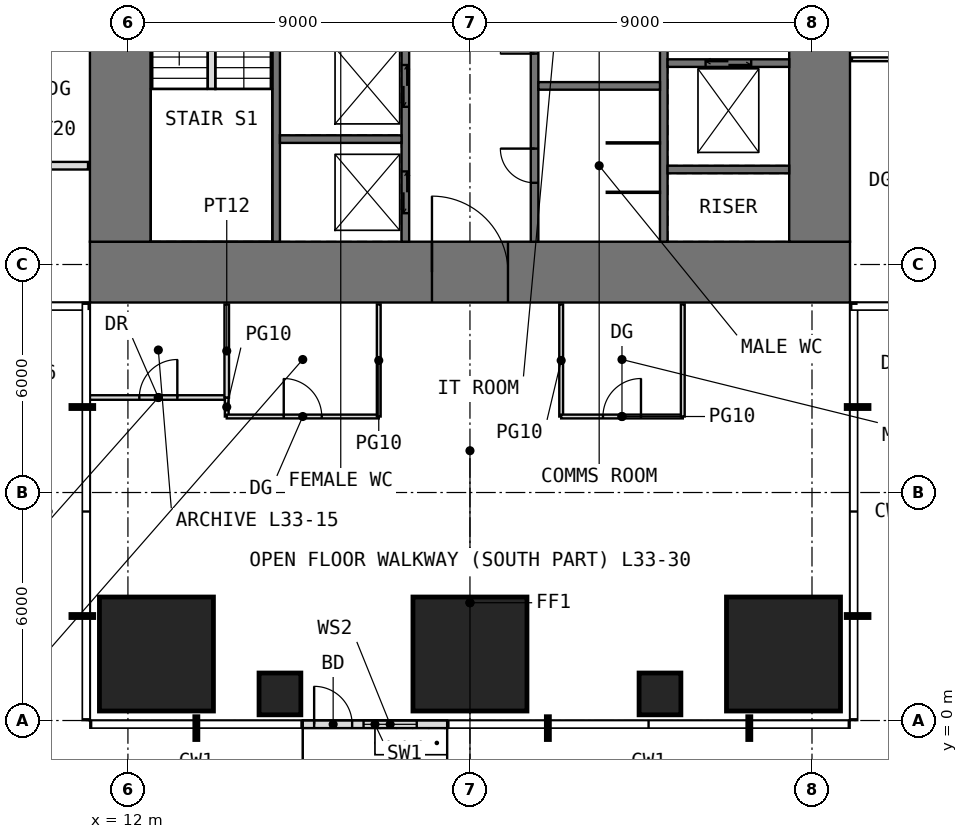
"""IFC4 building model, lengths in metres.
Left out: names, types, materials, properties, quantities, classifications, styles, units other than length and angle.
Written with IfcOpenShell. Run it as: python <this file> out.ifc"""

import sys

from ifc_helpers import new_model, si_unit, direction, frame, frame_2d, origin, origin_2d, place, context, subcontext, project, spatial, rectangle, extrude, element, fill, save


model = new_model("IFC4")
c1 = context("Model", 3, precision=1e-05, world=origin(), true_north=direction((0.0, 1.0)))
c2 = subcontext(c1, "Body", "Model", "MODEL_VIEW")
j1 = project(units=[si_unit("LENGTHUNIT", "METRE"), si_unit("PLANEANGLEUNIT", "RADIAN")], contexts=[c1])
p1 = place(None, origin())
s1 = spatial("IfcSite", under=j1, at=p1, CompositionType="ELEMENT")
p2 = place(p1, origin())
s2 = spatial("IfcBuilding", under=s1, at=p2, CompositionType="ELEMENT")
p3 = place(p2, frame((0.0, 0.0, 140.5)))
s3 = spatial("IfcBuildingStorey", under=s2, at=p3, CompositionType="ELEMENT", Elevation=140.5)
p4 = place(p3, frame((12.75, 1.75, 0.0), z_axis=(0.0, 0.0, 1.0), x_axis=(1.0, 0.0, 0.0)))
e1 = element("IfcColumn", 1, at=p4, inside=s3, PredefinedType="COLUMN", context=c2, shape_type="SweptSolid", body=[
    extrude(rectangle(XDim=3.0, YDim=3.0, at=origin_2d()), origin(), (0.0, 0.0, 1.0), 4.0),
])
p5 = place(p3, frame((16.0, 0.7, 0.0), z_axis=(0.0, 0.0, 1.0), x_axis=(1.0, 0.0, 0.0)))
e2 = element("IfcColumn", 2, at=p5, inside=s3, PredefinedType="COLUMN", context=c2, shape_type="SweptSolid", body=[
    extrude(rectangle(XDim=1.1, YDim=1.1, at=origin_2d()), origin(), (0.0, 0.0, 1.0), 4.0),
])
p6 = place(p3, frame((21.0, 1.75, 0.0), z_axis=(0.0, 0.0, 1.0), x_axis=(1.0, 0.0, 0.0)))
e3 = element("IfcColumn", 3, at=p6, inside=s3, PredefinedType="COLUMN", context=c2, shape_type="SweptSolid", body=[
    extrude(rectangle(XDim=3.0, YDim=3.0, at=origin_2d()), origin(), (0.0, 0.0, 1.0), 4.0),
])
p7 = place(p3, frame((26.0, 0.7, 0.0), z_axis=(0.0, 0.0, 1.0), x_axis=(1.0, 0.0, 0.0)))
e4 = element("IfcColumn", 4, at=p7, inside=s3, PredefinedType="COLUMN", context=c2, shape_type="SweptSolid", body=[
    extrude(rectangle(XDim=1.1, YDim=1.1, at=origin_2d()), origin(), (0.0, 0.0, 1.0), 4.0),
])
p8 = place(p3, frame((29.25, 1.75, 0.0), z_axis=(0.0, 0.0, 1.0), x_axis=(1.0, 0.0, 0.0)))
e5 = element("IfcColumn", 5, at=p8, inside=s3, PredefinedType="COLUMN", context=c2, shape_type="SweptSolid", body=[
    extrude(rectangle(XDim=3.0, YDim=3.0, at=origin_2d()), origin(), (0.0, 0.0, 1.0), 4.0),
])
p9 = place(p3, frame((16.6, -0.1, 0.0), z_axis=(0.0, 0.0, 1.0), x_axis=(1.0, 0.0, 0.0)))
e6 = element("IfcWall", 6, at=p9, inside=s3, PredefinedType="USERDEFINED", context=c2, shape_type="SweptSolid", body=[
    extrude(rectangle(XDim=3.8, YDim=0.2, at=frame_2d((1.9, 0.0))), origin(), (0.0, 0.0, 1.0), 3.75),
])
p10 = place(p9, frame((0.3, 0.0, 0.0)))
e7 = element("IfcOpeningElement", 7, at=p10, cuts=e6, PredefinedType="OPENING", context=c2, shape_type="SweptSolid", body=[
    extrude(rectangle(XDim=1.0, YDim=2.4, at=frame_2d((0.5, 1.2))), frame((0.0, 0.11, 0.0), z_axis=(0.0, -1.0, 0.0), x_axis=(1.0, 0.0, 0.0)), (0.0, 0.0, 1.0), 0.22),
])
p11 = place(p9, frame((1.6, 0.0, 0.3)))
e8 = element("IfcOpeningElement", 8, at=p11, cuts=e6, PredefinedType="OPENING", context=c2, shape_type="SweptSolid", body=[
    extrude(rectangle(XDim=1.4, YDim=2.7, at=frame_2d((0.7, 1.35))), frame((0.0, 0.11, 0.0), z_axis=(0.0, -1.0, 0.0), x_axis=(1.0, 0.0, 0.0)), (0.0, 0.0, 1.0), 0.22),
])
p12 = place(p3, frame((11.0, 11.8, -0.05), z_axis=(0.0, 0.0, 1.0), x_axis=(1.0, 0.0, 0.0)))
e9 = element("IfcWall", 9, at=p12, inside=s3, PredefinedType="SHEAR", context=c2, shape_type="SweptSolid", body=[
    extrude(rectangle(XDim=20.0, YDim=1.6, at=frame_2d((10.0, 0.0))), origin(), (0.0, 0.0, 1.0), 4.0),
])
p13 = place(p12, frame((9.0, 0.0, 0.05)))
e10 = element("IfcOpeningElement", 10, at=p13, cuts=e9, PredefinedType="OPENING", context=c2, shape_type="SweptSolid", body=[
    extrude(rectangle(XDim=2.0, YDim=2.2, at=frame_2d((1.0, 1.1))), frame((0.0, 0.81, 0.0), z_axis=(0.0, -1.0, 0.0), x_axis=(1.0, 0.0, 0.0)), (0.0, 0.0, 1.0), 1.62),
])
p14 = place(p3, frame((11.8, 12.6, -0.05), z_axis=(0.0, 0.0, 1.0), x_axis=(0.0, 1.0, 0.0)))
e11 = element("IfcWall", 11, at=p14, inside=s3, PredefinedType="SHEAR", context=c2, shape_type="SweptSolid", body=[
    extrude(rectangle(XDim=16.8, YDim=1.6, at=frame_2d((8.4, 0.0))), origin(), (0.0, 0.0, 1.0), 4.0),
])
p15 = place(p14, frame((9.9, 0.0, 0.05)))
e12 = element("IfcOpeningElement", 12, at=p15, cuts=e11, PredefinedType="OPENING", context=c2, shape_type="SweptSolid", body=[
    extrude(rectangle(XDim=1.0, YDim=2.2, at=frame_2d((0.5, 1.1))), frame((0.0, 0.81, 0.0), z_axis=(0.0, -1.0, 0.0), x_axis=(1.0, 0.0, 0.0)), (0.0, 0.0, 1.0), 1.62),
])
p16 = place(p3, frame((30.2, 12.6, -0.05), z_axis=(0.0, 0.0, 1.0), x_axis=(0.0, 1.0, 0.0)))
e13 = element("IfcWall", 13, at=p16, inside=s3, PredefinedType="SHEAR", context=c2, shape_type="SweptSolid", body=[
    extrude(rectangle(XDim=16.8, YDim=1.6, at=frame_2d((8.4, 0.0))), origin(), (0.0, 0.0, 1.0), 4.0),
])
p17 = place(p16, frame((5.9, 0.0, 0.05)))
e14 = element("IfcOpeningElement", 14, at=p17, cuts=e13, PredefinedType="OPENING", context=c2, shape_type="SweptSolid", body=[
    extrude(rectangle(XDim=1.0, YDim=2.2, at=frame_2d((0.5, 1.1))), frame((0.0, 0.81, 0.0), z_axis=(0.0, -1.0, 0.0), x_axis=(1.0, 0.0, 0.0)), (0.0, 0.0, 1.0), 1.62),
])
p18 = place(p3, frame((15.9, 12.6, -0.05), z_axis=(0.0, 0.0, 1.0), x_axis=(0.0, 1.0, 0.0)))
e15 = element("IfcWall", 15, at=p18, inside=s3, PredefinedType="SHEAR", context=c2, shape_type="SweptSolid", body=[
    extrude(rectangle(XDim=16.8, YDim=0.2, at=frame_2d((8.4, 0.0))), origin(), (0.0, 0.0, 1.0), 4.0),
])
p19 = place(p18, frame((8.9, 0.0, 0.05)))
e16 = element("IfcOpeningElement", 16, at=p19, cuts=e15, PredefinedType="OPENING", context=c2, shape_type="SweptSolid", body=[
    extrude(rectangle(XDim=1.0, YDim=2.2, at=frame_2d((0.5, 1.1))), frame((0.0, 0.11, 0.0), z_axis=(0.0, -1.0, 0.0), x_axis=(1.0, 0.0, 0.0)), (0.0, 0.0, 1.0), 0.22),
])
p20 = place(p3, frame((19.3, 12.6, -0.05), z_axis=(0.0, 0.0, 1.0), x_axis=(0.0, 1.0, 0.0)))
e17 = element("IfcWall", 17, at=p20, inside=s3, PredefinedType="SHEAR", context=c2, shape_type="SweptSolid", body=[
    extrude(rectangle(XDim=16.8, YDim=0.2, at=frame_2d((8.4, 0.0))), origin(), (0.0, 0.0, 1.0), 4.0),
])
p21 = place(p20, frame((8.7, 0.0, 0.05)))
e18 = element("IfcOpeningElement", 18, at=p21, cuts=e17, PredefinedType="OPENING", context=c2, shape_type="SweptSolid", body=[
    extrude(rectangle(XDim=1.0, YDim=2.2, at=frame_2d((0.5, 1.1))), frame((0.0, 0.11, 0.0), z_axis=(0.0, -1.0, 0.0), x_axis=(1.0, 0.0, 0.0)), (0.0, 0.0, 1.0), 0.22),
])
p22 = place(p20, frame((10.85, 0.0, 0.05)))
e19 = element("IfcOpeningElement", 19, at=p22, cuts=e17, PredefinedType="OPENING", context=c2, shape_type="SweptSolid", body=[
    extrude(rectangle(XDim=0.9, YDim=2.2, at=frame_2d((0.45, 1.1))), frame((0.0, 0.11, 0.0), z_axis=(0.0, -1.0, 0.0), x_axis=(1.0, 0.0, 0.0)), (0.0, 0.0, 1.0), 0.22),
])
p23 = place(p20, frame((13.3, 0.0, 0.05)))
e20 = element("IfcOpeningElement", 20, at=p23, cuts=e17, PredefinedType="OPENING", context=c2, shape_type="SweptSolid", body=[
    extrude(rectangle(XDim=1.0, YDim=2.2, at=frame_2d((0.5, 1.1))), frame((0.0, 0.11, 0.0), z_axis=(0.0, -1.0, 0.0), x_axis=(1.0, 0.0, 0.0)), (0.0, 0.0, 1.0), 0.22),
])
p24 = place(p20, frame((15.55, 0.0, 0.05)))
e21 = element("IfcOpeningElement", 21, at=p24, cuts=e17, PredefinedType="OPENING", context=c2, shape_type="SweptSolid", body=[
    extrude(rectangle(XDim=0.9, YDim=2.2, at=frame_2d((0.45, 1.1))), frame((0.0, 0.11, 0.0), z_axis=(0.0, -1.0, 0.0), x_axis=(1.0, 0.0, 0.0)), (0.0, 0.0, 1.0), 0.22),
])
p25 = place(p20, frame((0.75, 0.0, 0.05)))
e22 = element("IfcOpeningElement", 22, at=p25, cuts=e17, PredefinedType="OPENING", context=c2, shape_type="SweptSolid", body=[
    extrude(rectangle(XDim=1.1, YDim=2.2, at=frame_2d((0.55, 1.1))), frame((0.0, 0.11, 0.0), z_axis=(0.0, -1.0, 0.0), x_axis=(1.0, 0.0, 0.0)), (0.0, 0.0, 1.0), 0.22),
])
p26 = place(p20, frame((3.55, 0.0, 0.05)))
e23 = element("IfcOpeningElement", 23, at=p26, cuts=e17, PredefinedType="OPENING", context=c2, shape_type="SweptSolid", body=[
    extrude(rectangle(XDim=1.1, YDim=2.2, at=frame_2d((0.55, 1.1))), frame((0.0, 0.11, 0.0), z_axis=(0.0, -1.0, 0.0), x_axis=(1.0, 0.0, 0.0)), (0.0, 0.0, 1.0), 0.22),
])
p27 = place(p20, frame((6.35, 0.0, 0.05)))
e24 = element("IfcOpeningElement", 24, at=p27, cuts=e17, PredefinedType="OPENING", context=c2, shape_type="SweptSolid", body=[
    extrude(rectangle(XDim=1.1, YDim=2.2, at=frame_2d((0.55, 1.1))), frame((0.0, 0.11, 0.0), z_axis=(0.0, -1.0, 0.0), x_axis=(1.0, 0.0, 0.0)), (0.0, 0.0, 1.0), 0.22),
])
p28 = place(p3, frame((22.7, 12.6, -0.05), z_axis=(0.0, 0.0, 1.0), x_axis=(0.0, 1.0, 0.0)))
e25 = element("IfcWall", 25, at=p28, inside=s3, PredefinedType="SHEAR", context=c2, shape_type="SweptSolid", body=[
    extrude(rectangle(XDim=16.8, YDim=0.2, at=frame_2d((8.4, 0.0))), origin(), (0.0, 0.0, 1.0), 4.0),
])
p29 = place(p28, frame((7.1, 0.0, 0.05)))
e26 = element("IfcOpeningElement", 26, at=p29, cuts=e25, PredefinedType="OPENING", context=c2, shape_type="SweptSolid", body=[
    extrude(rectangle(XDim=1.0, YDim=2.2, at=frame_2d((0.5, 1.1))), frame((0.0, 0.11, 0.0), z_axis=(0.0, -1.0, 0.0), x_axis=(1.0, 0.0, 0.0)), (0.0, 0.0, 1.0), 0.22),
])
p30 = place(p28, frame((1.55, 0.0, 0.05)))
e27 = element("IfcOpeningElement", 27, at=p30, cuts=e25, PredefinedType="OPENING", context=c2, shape_type="SweptSolid", body=[
    extrude(rectangle(XDim=0.9, YDim=2.2, at=frame_2d((0.45, 1.1))), frame((0.0, 0.11, 0.0), z_axis=(0.0, -1.0, 0.0), x_axis=(1.0, 0.0, 0.0)), (0.0, 0.0, 1.0), 0.22),
])
p31 = place(p28, frame((4.95, 0.0, 0.05)))
e28 = element("IfcOpeningElement", 28, at=p31, cuts=e25, PredefinedType="OPENING", context=c2, shape_type="SweptSolid", body=[
    extrude(rectangle(XDim=0.9, YDim=2.2, at=frame_2d((0.45, 1.1))), frame((0.0, 0.11, 0.0), z_axis=(0.0, -1.0, 0.0), x_axis=(1.0, 0.0, 0.0)), (0.0, 0.0, 1.0), 0.22),
])
p32 = place(p28, frame((9.4, 0.0, 0.05)))
e29 = element("IfcOpeningElement", 29, at=p32, cuts=e25, PredefinedType="OPENING", context=c2, shape_type="SweptSolid", body=[
    extrude(rectangle(XDim=1.0, YDim=2.2, at=frame_2d((0.5, 1.1))), frame((0.0, 0.11, 0.0), z_axis=(0.0, -1.0, 0.0), x_axis=(1.0, 0.0, 0.0)), (0.0, 0.0, 1.0), 0.22),
])
p33 = place(p3, frame((26.1, 12.6, -0.05), z_axis=(0.0, 0.0, 1.0), x_axis=(0.0, 1.0, 0.0)))
e30 = element("IfcWall", 30, at=p33, inside=s3, PredefinedType="SHEAR", context=c2, shape_type="SweptSolid", body=[
    extrude(rectangle(XDim=16.8, YDim=0.2, at=frame_2d((8.4, 0.0))), origin(), (0.0, 0.0, 1.0), 4.0),
])
p34 = place(p33, frame((6.9, 0.0, 0.05)))
e31 = element("IfcOpeningElement", 31, at=p34, cuts=e30, PredefinedType="OPENING", context=c2, shape_type="SweptSolid", body=[
    extrude(rectangle(XDim=1.0, YDim=2.2, at=frame_2d((0.5, 1.1))), frame((0.0, 0.11, 0.0), z_axis=(0.0, -1.0, 0.0), x_axis=(1.0, 0.0, 0.0)), (0.0, 0.0, 1.0), 0.22),
])
for number, where, z_axis, x_axis in (
    (32, (16.0, 15.3, -0.05), (0.0, 0.0, 1.0), (1.0, 0.0, 0.0)),
    (33, (22.8, 16.7, -0.05), (0.0, 0.0, 1.0), (1.0, 0.0, 0.0)),
    (34, (26.2, 14.5, -0.05), (0.0, 0.0, 1.0), (1.0, 0.0, 0.0)),
):
    element("IfcWall", number, at=place(p3, frame(where, z_axis=z_axis, x_axis=x_axis)), inside=s3, PredefinedType="SHEAR", context=c2, shape_type="SweptSolid", body=[
        extrude(rectangle(XDim=3.2, YDim=0.2, at=frame_2d((1.6, 0.0))), origin(), (0.0, 0.0, 1.0), 4.0),
    ])
p35 = place(p3, frame((26.2, 17.3, -0.05), z_axis=(0.0, 0.0, 1.0), x_axis=(1.0, 0.0, 0.0)))
e35 = element("IfcWall", 35, at=p35, inside=s3, PredefinedType="SHEAR", context=c2, shape_type="SweptSolid", body=[
    extrude(rectangle(XDim=3.2, YDim=0.2, at=frame_2d((1.6, 0.0))), origin(), (0.0, 0.0, 1.0), 4.0),
])
p36 = place(p35, frame((1.0, 0.0, 0.05)))
e36 = element("IfcOpeningElement", 36, at=p36, cuts=e35, PredefinedType="OPENING", context=c2, shape_type="SweptSolid", body=[
    extrude(rectangle(XDim=1.2, YDim=2.2, at=frame_2d((0.6, 1.1))), frame((0.0, 0.11, 0.0), z_axis=(0.0, -1.0, 0.0), x_axis=(1.0, 0.0, 0.0)), (0.0, 0.0, 1.0), 0.22),
])
for number, where, z_axis, x_axis in (
    (37, (24.6, 13.9, 0.0), (0.0, 0.0, 1.0), (1.0, 0.0, 0.0)),
    (38, (24.6, 15.2, 0.0), (0.0, 0.0, 1.0), (1.0, 0.0, 0.0)),
):
    element("IfcWall", number, at=place(p3, frame(where, z_axis=z_axis, x_axis=x_axis)), inside=s3, PredefinedType="PARTITIONING", context=c2, shape_type="SweptSolid", body=[
        extrude(rectangle(XDim=1.4, YDim=0.03, at=frame_2d((0.7, 0.0))), origin(), (0.0, 0.0, 1.0), 3.75),
    ])
p37 = place(p3, frame((8.0, 14.6, 0.0), z_axis=(0.0, 0.0, 1.0), x_axis=(1.0, 0.0, 0.0)))
e39 = element("IfcWall", 39, at=p37, inside=s3, PredefinedType="PARTITIONING", context=c2, shape_type="SweptSolid", body=[
    extrude(rectangle(XDim=2.95, YDim=0.2, at=frame_2d((1.475, 0.0))), origin(), (0.0, 0.0, 1.0), 3.75),
])
p38 = place(p3, frame((11.0, 8.5, 0.0), z_axis=(0.0, 0.0, 1.0), x_axis=(1.0, 0.0, 0.0)))
e40 = element("IfcWall", 40, at=p38, inside=s3, PredefinedType="PARTITIONING", context=c2, shape_type="SweptSolid", body=[
    extrude(rectangle(XDim=3.6, YDim=0.12, at=frame_2d((1.8, 0.0))), origin(), (0.0, 0.0, 1.0), 3.75),
])
p39 = place(p38, frame((1.3, 0.0, 0.0)))
e41 = element("IfcOpeningElement", 41, at=p39, cuts=e40, PredefinedType="OPENING", context=c2, shape_type="SweptSolid", body=[
    extrude(rectangle(XDim=1.0, YDim=2.2, at=frame_2d((0.5, 1.1))), frame((0.0, 0.07, 0.0), z_axis=(0.0, -1.0, 0.0), x_axis=(1.0, 0.0, 0.0)), (0.0, 0.0, 1.0), 0.14),
])
p40 = place(p3, frame((14.6, 8.0, 0.0), z_axis=(0.0, 0.0, 1.0), x_axis=(0.0, 1.0, 0.0)))
e42 = element("IfcWall", 42, at=p40, inside=s3, PredefinedType="PARTITIONING", context=c2, shape_type="SweptSolid", body=[
    extrude(rectangle(XDim=0.5, YDim=0.1, at=frame_2d((0.25, 0.0))), origin(), (0.0, 0.0, 1.0), 3.75),
])
p41 = place(p3, frame((14.6, 8.0, 0.0), z_axis=(0.0, 0.0, 1.0), x_axis=(1.0, 0.0, 0.0)))
e43 = element("IfcWall", 43, at=p41, inside=s3, PredefinedType="PARTITIONING", context=c2, shape_type="SweptSolid", body=[
    extrude(rectangle(XDim=4.0, YDim=0.1, at=frame_2d((2.0, 0.0))), origin(), (0.0, 0.0, 1.0), 3.75),
])
p42 = place(p41, frame((1.5, 0.0, 0.0)))
e44 = element("IfcOpeningElement", 44, at=p42, cuts=e43, PredefinedType="OPENING", context=c2, shape_type="SweptSolid", body=[
    extrude(rectangle(XDim=1.0, YDim=2.4, at=frame_2d((0.5, 1.2))), frame((0.0, 0.06, 0.0), z_axis=(0.0, -1.0, 0.0), x_axis=(1.0, 0.0, 0.0)), (0.0, 0.0, 1.0), 0.12),
])
p43 = place(p3, frame((14.6, 8.5, 0.0), z_axis=(0.0, 0.0, 1.0), x_axis=(0.0, 1.0, 0.0)))
e45 = element("IfcWall", 45, at=p43, inside=s3, PredefinedType="PARTITIONING", context=c2, shape_type="SweptSolid", body=[
    extrude(rectangle(XDim=2.45, YDim=0.12, at=frame_2d((1.225, 0.0))), origin(), (0.0, 0.0, 1.0), 3.75),
])
for number, where, z_axis, x_axis in (
    (46, (18.6, 8.0, 0.0), (0.0, 0.0, 1.0), (0.0, 1.0, 0.0)),
    (47, (23.4, 8.0, 0.0), (0.0, 0.0, 1.0), (0.0, 1.0, 0.0)),
):
    element("IfcWall", number, at=place(p3, frame(where, z_axis=z_axis, x_axis=x_axis)), inside=s3, PredefinedType="PARTITIONING", context=c2, shape_type="SweptSolid", body=[
        extrude(rectangle(XDim=2.95, YDim=0.1, at=frame_2d((1.475, 0.0))), origin(), (0.0, 0.0, 1.0), 3.75),
    ])
p44 = place(p3, frame((23.4, 8.0, 0.0), z_axis=(0.0, 0.0, 1.0), x_axis=(1.0, 0.0, 0.0)))
e48 = element("IfcWall", 48, at=p44, inside=s3, PredefinedType="PARTITIONING", context=c2, shape_type="SweptSolid", body=[
    extrude(rectangle(XDim=3.2, YDim=0.1, at=frame_2d((1.6, 0.0))), origin(), (0.0, 0.0, 1.0), 3.75),
])
p45 = place(p44, frame((1.1, 0.0, 0.0)))
e49 = element("IfcOpeningElement", 49, at=p45, cuts=e48, PredefinedType="OPENING", context=c2, shape_type="SweptSolid", body=[
    extrude(rectangle(XDim=1.0, YDim=2.4, at=frame_2d((0.5, 1.2))), frame((0.0, 0.06, 0.0), z_axis=(0.0, -1.0, 0.0), x_axis=(1.0, 0.0, 0.0)), (0.0, 0.0, 1.0), 0.12),
])
for number, where, z_axis, x_axis in (
    (50, (26.6, 8.0, 0.0), (0.0, 0.0, 1.0), (0.0, 1.0, 0.0)),
    (51, (31.05, 17.4, 0.0), (0.0, 0.0, 1.0), (1.0, 0.0, 0.0)),
):
    element("IfcWall", number, at=place(p3, frame(where, z_axis=z_axis, x_axis=x_axis)), inside=s3, PredefinedType="PARTITIONING", context=c2, shape_type="SweptSolid", body=[
        extrude(rectangle(XDim=2.95, YDim=0.1, at=frame_2d((1.475, 0.0))), origin(), (0.0, 0.0, 1.0), 3.75),
    ])
p46 = place(p3, frame((14.2, 16.62, 0.0), z_axis=(0.0, 0.0, 1.0), x_axis=(0.0, 1.0, 0.0)))
e52 = element("IfcWall", 52, at=p46, inside=s3, PredefinedType="PARTITIONING", context=c2, shape_type="SweptSolid", body=[
    extrude(rectangle(XDim=3.08, YDim=0.2, at=frame_2d((1.54, 0.0))), origin(), (0.0, 0.0, 1.0), 4.0),
])
p47 = place(p10, origin())
e53 = element("IfcDoor", 53, at=p47, inside=s3, OperationType="SINGLE_SWING_LEFT", PredefinedType="DOOR", context=c2, shape_type="SweptSolid", body=[
    extrude(rectangle(XDim=1.0, YDim=2.4, at=frame_2d((0.5, 1.2))), frame((0.0, 0.025, 0.0), z_axis=(0.0, -1.0, 0.0), x_axis=(1.0, 0.0, 0.0)), (0.0, 0.0, 1.0), 0.05),
])
fill(e7, e53)
p48 = place(p11, origin())
e54 = element("IfcWindow", 54, at=p48, inside=s3, PartitioningType="SINGLE_PANEL", PredefinedType="WINDOW", context=c2, shape_type="SweptSolid", body=[
    extrude(rectangle(XDim=1.4, YDim=2.7, at=frame_2d((0.7, 1.35))), frame((0.0, 0.03, 0.0), z_axis=(0.0, -1.0, 0.0), x_axis=(1.0, 0.0, 0.0)), (0.0, 0.0, 1.0), 0.06),
])
fill(e8, e54)
p49 = place(p13, origin())
e55 = element("IfcDoor", 55, at=p49, inside=s3, OperationType="DOUBLE_DOOR_SINGLE_SWING", PredefinedType="DOOR", context=c2, shape_type="SweptSolid", body=[
    extrude(rectangle(XDim=2.0, YDim=2.2, at=frame_2d((1.0, 1.1))), frame((0.0, 0.025, 0.0), z_axis=(0.0, -1.0, 0.0), x_axis=(1.0, 0.0, 0.0)), (0.0, 0.0, 1.0), 0.05),
])
fill(e10, e55)
p50 = place(p30, origin())
e56 = element("IfcDoor", 56, at=p50, inside=s3, OperationType="SINGLE_SWING_RIGHT", PredefinedType="DOOR", context=c2, shape_type="SweptSolid", body=[
    extrude(rectangle(XDim=0.9, YDim=2.2, at=frame_2d((0.45, 1.1))), frame((0.0, 0.025, 0.0), z_axis=(0.0, -1.0, 0.0), x_axis=(1.0, 0.0, 0.0)), (0.0, 0.0, 1.0), 0.05),
])
fill(e27, e56)
p51 = place(p31, origin())
e57 = element("IfcDoor", 57, at=p51, inside=s3, OperationType="SINGLE_SWING_LEFT", PredefinedType="DOOR", context=c2, shape_type="SweptSolid", body=[
    extrude(rectangle(XDim=0.9, YDim=2.2, at=frame_2d((0.45, 1.1))), frame((0.0, 0.025, 0.0), z_axis=(0.0, -1.0, 0.0), x_axis=(1.0, 0.0, 0.0)), (0.0, 0.0, 1.0), 0.05),
])
fill(e28, e57)
p52 = place(p39, origin())
e58 = element("IfcDoor", 58, at=p52, inside=s3, OperationType="SINGLE_SWING_RIGHT", PredefinedType="DOOR", context=c2, shape_type="SweptSolid", body=[
    extrude(rectangle(XDim=1.0, YDim=2.2, at=frame_2d((0.5, 1.1))), frame((0.0, 0.025, 0.0), z_axis=(0.0, -1.0, 0.0), x_axis=(1.0, 0.0, 0.0)), (0.0, 0.0, 1.0), 0.05),
])
fill(e41, e58)
p53 = place(p42, origin())
e59 = element("IfcDoor", 59, at=p53, inside=s3, OperationType="SINGLE_SWING_LEFT", PredefinedType="DOOR", context=c2, shape_type="SweptSolid", body=[
    extrude(rectangle(XDim=1.0, YDim=2.4, at=frame_2d((0.5, 1.2))), frame((0.0, 0.025, 0.0), z_axis=(0.0, -1.0, 0.0), x_axis=(1.0, 0.0, 0.0)), (0.0, 0.0, 1.0), 0.05),
])
fill(e44, e59)
p54 = place(p45, origin())
e60 = element("IfcDoor", 60, at=p54, inside=s3, OperationType="SINGLE_SWING_RIGHT", PredefinedType="DOOR", context=c2, shape_type="SweptSolid", body=[
    extrude(rectangle(XDim=1.0, YDim=2.4, at=frame_2d((0.5, 1.2))), frame((0.0, 0.025, 0.0), z_axis=(0.0, -1.0, 0.0), x_axis=(1.0, 0.0, 0.0)), (0.0, 0.0, 1.0), 0.05),
])
fill(e49, e60)
p55 = place(p25, origin())
e61 = element("IfcDoor", 61, at=p55, inside=s3, OperationType="DOUBLE_DOOR_SLIDING", PredefinedType="DOOR", context=c2, shape_type="SweptSolid", body=[
    extrude(rectangle(XDim=1.1, YDim=2.2, at=frame_2d((0.55, 1.1))), frame((0.0, 0.025, 0.0), z_axis=(0.0, -1.0, 0.0), x_axis=(1.0, 0.0, 0.0)), (0.0, 0.0, 1.0), 0.05),
])
fill(e22, e61)
p56 = place(p26, origin())
e62 = element("IfcDoor", 62, at=p56, inside=s3, OperationType="DOUBLE_DOOR_SLIDING", PredefinedType="DOOR", context=c2, shape_type="SweptSolid", body=[
    extrude(rectangle(XDim=1.1, YDim=2.2, at=frame_2d((0.55, 1.1))), frame((0.0, 0.025, 0.0), z_axis=(0.0, -1.0, 0.0), x_axis=(1.0, 0.0, 0.0)), (0.0, 0.0, 1.0), 0.05),
])
fill(e23, e62)
p57 = place(p36, origin())
e63 = element("IfcDoor", 63, at=p57, inside=s3, OperationType="DOUBLE_DOOR_SLIDING", PredefinedType="DOOR", context=c2, shape_type="SweptSolid", body=[
    extrude(rectangle(XDim=1.2, YDim=2.2, at=frame_2d((0.6, 1.1))), frame((0.0, 0.025, 0.0), z_axis=(0.0, -1.0, 0.0), x_axis=(1.0, 0.0, 0.0)), (0.0, 0.0, 1.0), 0.05),
])
fill(e36, e63)
save(model, sys.argv[1])
